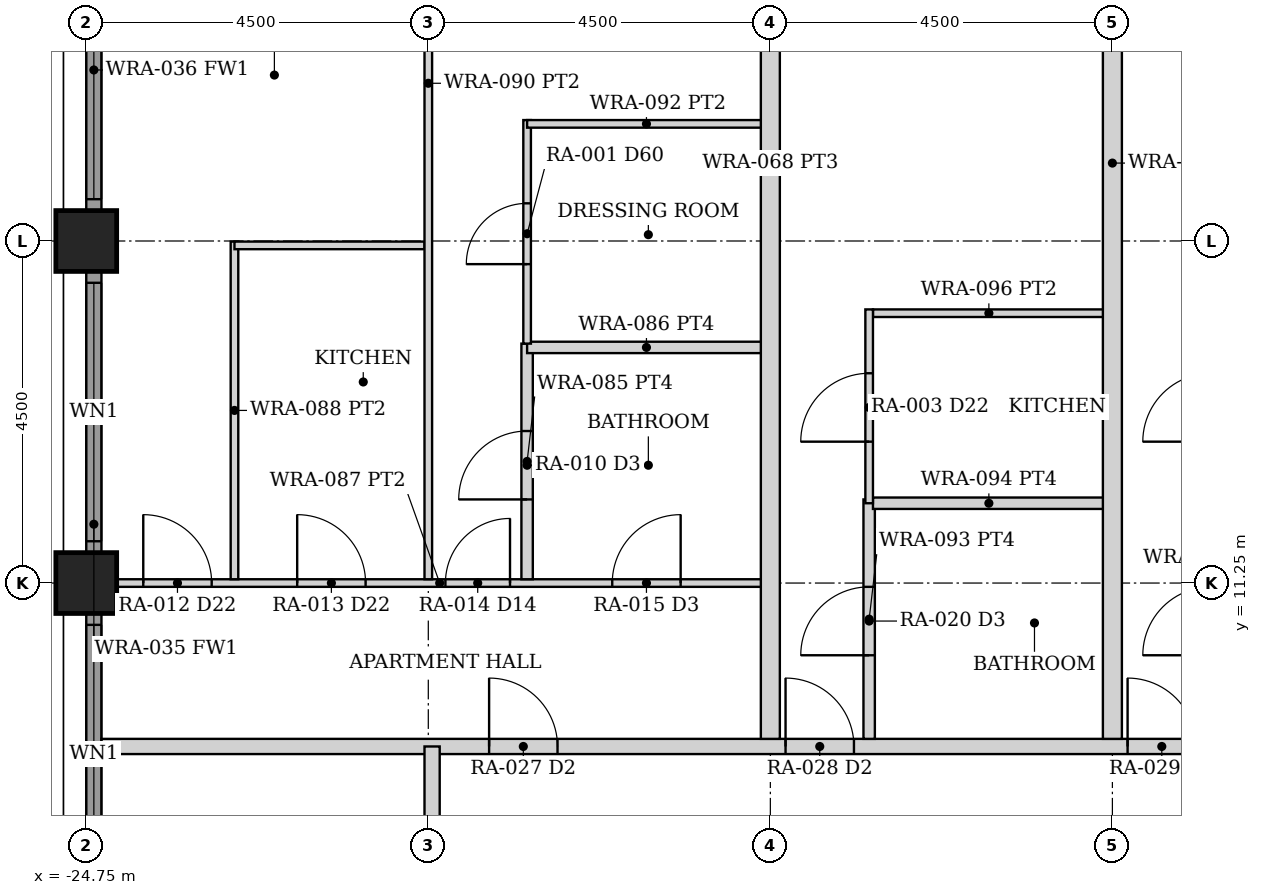
"""IFC4 building model, lengths in metres.
Left out: names, types, materials, properties, quantities, classifications, styles, units other than length and angle.
Written with IfcOpenShell. Run it as: python <this file> out.ifc"""

import sys

from ifc_helpers import new_model, si_unit, direction, frame, frame_2d, origin, origin_2d, place, context, subcontext, project, spatial, rectangle, hollow_rectangle, extrude, element, fill, save


model = new_model("IFC4")
c1 = context("Model", 3, precision=1e-05, world=origin(), true_north=direction((0.0, 1.0)))
c2 = subcontext(c1, "Body", "Model", "MODEL_VIEW")
j1 = project(units=[si_unit("LENGTHUNIT", "METRE"), si_unit("PLANEANGLEUNIT", "RADIAN")], contexts=[c1])
p1 = place(None, origin())
s1 = spatial("IfcSite", under=j1, at=p1, CompositionType="ELEMENT")
p2 = place(p1, origin())
s2 = spatial("IfcBuilding", under=s1, at=p2, CompositionType="ELEMENT")
p3 = place(p2, frame((0.0, 0.0, 30.0)))
s3 = spatial("IfcBuildingStorey", under=s2, at=p3, CompositionType="ELEMENT", Elevation=30.0)
for number, where, z_axis, x_axis in (
    (1, (-24.75, 11.25, 0.0), (0.0, 0.0, 1.0), (1.0, 0.0, 0.0)),
    (2, (-24.75, 15.75, 0.0), (0.0, 0.0, 1.0), (1.0, 0.0, 0.0)),
):
    element("IfcColumn", number, at=place(p3, frame(where, z_axis=z_axis, x_axis=x_axis)), inside=s3, PredefinedType="COLUMN", context=c2, shape_type="SweptSolid", body=[
        extrude(hollow_rectangle(XDim=0.8, YDim=0.8, WallThickness=0.08, at=origin_2d()), origin(), (0.0, 0.0, 1.0), 3.5),
    ])
p4 = place(p3, frame((-24.65, 7.155, 0.0), z_axis=(0.0, 0.0, 1.0), x_axis=(0.0, 1.0, 0.0)))
e3 = element("IfcWall", 3, at=p4, inside=s3, PredefinedType="SOLIDWALL", context=c2, shape_type="SweptSolid", body=[
    extrude(rectangle(XDim=3.69, YDim=0.2, at=frame_2d((1.845, 0.0))), origin(), (0.0, 0.0, 1.0), 2.379),
])
p5 = place(p4, frame((0.145, 0.0, 0.3)))
e4 = element("IfcOpeningElement", 4, at=p5, cuts=e3, PredefinedType="OPENING", context=c2, shape_type="SweptSolid", body=[
    extrude(rectangle(XDim=3.4, YDim=1.929, at=frame_2d((1.7, 0.964))), frame((0.0, 0.11, 0.0), z_axis=(0.0, -1.0, 0.0), x_axis=(1.0, 0.0, 0.0)), (0.0, 0.0, 1.0), 0.22),
])
p6 = place(p3, frame((-24.65, 11.655, 0.0), z_axis=(0.0, 0.0, 1.0), x_axis=(0.0, 1.0, 0.0)))
e5 = element("IfcWall", 5, at=p6, inside=s3, PredefinedType="SOLIDWALL", context=c2, shape_type="SweptSolid", body=[
    extrude(rectangle(XDim=3.69, YDim=0.2, at=frame_2d((1.845, 0.0))), origin(), (0.0, 0.0, 1.0), 2.379),
])
p7 = place(p6, frame((0.145, 0.0, 0.3)))
e6 = element("IfcOpeningElement", 6, at=p7, cuts=e5, PredefinedType="OPENING", context=c2, shape_type="SweptSolid", body=[
    extrude(rectangle(XDim=3.4, YDim=1.929, at=frame_2d((1.7, 0.964))), frame((0.0, 0.11, 0.0), z_axis=(0.0, -1.0, 0.0), x_axis=(1.0, 0.0, 0.0)), (0.0, 0.0, 1.0), 0.22),
])
p8 = place(p3, frame((-24.65, 16.155, 0.0), z_axis=(0.0, 0.0, 1.0), x_axis=(0.0, 1.0, 0.0)))
e7 = element("IfcWall", 7, at=p8, inside=s3, PredefinedType="SOLIDWALL", context=c2, shape_type="SweptSolid", body=[
    extrude(rectangle(XDim=3.69, YDim=0.2, at=frame_2d((1.845, 0.0))), origin(), (0.0, 0.0, 1.0), 2.379),
])
p9 = place(p8, frame((0.145, 0.0, 0.3)))
e8 = element("IfcOpeningElement", 8, at=p9, cuts=e7, PredefinedType="OPENING", context=c2, shape_type="SweptSolid", body=[
    extrude(rectangle(XDim=3.4, YDim=1.929, at=frame_2d((1.7, 0.964))), frame((0.0, 0.11, 0.0), z_axis=(0.0, -1.0, 0.0), x_axis=(1.0, 0.0, 0.0)), (0.0, 0.0, 1.0), 0.22),
])
p10 = place(p3, frame((-24.55, 9.1, 0.0), z_axis=(0.0, 0.0, 1.0), x_axis=(1.0, 0.0, 0.0)))
e9 = element("IfcWall", 9, at=p10, inside=s3, PredefinedType="PARTITIONING", context=c2, shape_type="SweptSolid", body=[
    extrude(rectangle(XDim=49.1, YDim=0.2, at=frame_2d((24.55, 0.0))), origin(), (0.0, 0.0, 1.0), 2.373),
])
p11 = place(p10, frame((5.1, 0.0, 0.0)))
e10 = element("IfcOpeningElement", 10, at=p11, cuts=e9, PredefinedType="OPENING", context=c2, shape_type="SweptSolid", body=[
    extrude(rectangle(XDim=0.9, YDim=2.1, at=frame_2d((0.45, 1.05))), frame((0.0, 0.11, 0.0), z_axis=(0.0, -1.0, 0.0), x_axis=(1.0, 0.0, 0.0)), (0.0, 0.0, 1.0), 0.22),
])
p12 = place(p10, frame((9.0, 0.0, 0.0)))
e11 = element("IfcOpeningElement", 11, at=p12, cuts=e9, PredefinedType="OPENING", context=c2, shape_type="SweptSolid", body=[
    extrude(rectangle(XDim=0.9, YDim=2.1, at=frame_2d((0.45, 1.05))), frame((0.0, 0.11, 0.0), z_axis=(0.0, -1.0, 0.0), x_axis=(1.0, 0.0, 0.0)), (0.0, 0.0, 1.0), 0.22),
])
p13 = place(p10, frame((13.5, 0.0, 0.0)))
e12 = element("IfcOpeningElement", 12, at=p13, cuts=e9, PredefinedType="OPENING", context=c2, shape_type="SweptSolid", body=[
    extrude(rectangle(XDim=0.9, YDim=2.1, at=frame_2d((0.45, 1.05))), frame((0.0, 0.11, 0.0), z_axis=(0.0, -1.0, 0.0), x_axis=(1.0, 0.0, 0.0)), (0.0, 0.0, 1.0), 0.22),
])
p14 = place(p10, frame((18.0, 0.0, 0.0)))
e13 = element("IfcOpeningElement", 13, at=p14, cuts=e9, PredefinedType="OPENING", context=c2, shape_type="SweptSolid", body=[
    extrude(rectangle(XDim=0.9, YDim=2.1, at=frame_2d((0.45, 1.05))), frame((0.0, 0.11, 0.0), z_axis=(0.0, -1.0, 0.0), x_axis=(1.0, 0.0, 0.0)), (0.0, 0.0, 1.0), 0.22),
])
p15 = place(p10, frame((22.5, 0.0, 0.0)))
e14 = element("IfcOpeningElement", 14, at=p15, cuts=e9, PredefinedType="OPENING", context=c2, shape_type="SweptSolid", body=[
    extrude(rectangle(XDim=0.9, YDim=2.1, at=frame_2d((0.45, 1.05))), frame((0.0, 0.11, 0.0), z_axis=(0.0, -1.0, 0.0), x_axis=(1.0, 0.0, 0.0)), (0.0, 0.0, 1.0), 0.22),
])
p16 = place(p10, frame((27.0, 0.0, 0.0)))
e15 = element("IfcOpeningElement", 15, at=p16, cuts=e9, PredefinedType="OPENING", context=c2, shape_type="SweptSolid", body=[
    extrude(rectangle(XDim=0.9, YDim=2.1, at=frame_2d((0.45, 1.05))), frame((0.0, 0.11, 0.0), z_axis=(0.0, -1.0, 0.0), x_axis=(1.0, 0.0, 0.0)), (0.0, 0.0, 1.0), 0.22),
])
p17 = place(p10, frame((31.5, 0.0, 0.0)))
e16 = element("IfcOpeningElement", 16, at=p17, cuts=e9, PredefinedType="OPENING", context=c2, shape_type="SweptSolid", body=[
    extrude(rectangle(XDim=0.9, YDim=2.1, at=frame_2d((0.45, 1.05))), frame((0.0, 0.11, 0.0), z_axis=(0.0, -1.0, 0.0), x_axis=(1.0, 0.0, 0.0)), (0.0, 0.0, 1.0), 0.22),
])
p18 = place(p10, frame((36.0, 0.0, 0.0)))
e17 = element("IfcOpeningElement", 17, at=p18, cuts=e9, PredefinedType="OPENING", context=c2, shape_type="SweptSolid", body=[
    extrude(rectangle(XDim=0.9, YDim=2.1, at=frame_2d((0.45, 1.05))), frame((0.0, 0.11, 0.0), z_axis=(0.0, -1.0, 0.0), x_axis=(1.0, 0.0, 0.0)), (0.0, 0.0, 1.0), 0.22),
])
p19 = place(p10, frame((43.1, 0.0, 0.0)))
e18 = element("IfcOpeningElement", 18, at=p19, cuts=e9, PredefinedType="OPENING", context=c2, shape_type="SweptSolid", body=[
    extrude(rectangle(XDim=0.9, YDim=2.1, at=frame_2d((0.45, 1.05))), frame((0.0, 0.11, 0.0), z_axis=(0.0, -1.0, 0.0), x_axis=(1.0, 0.0, 0.0)), (0.0, 0.0, 1.0), 0.22),
])
p20 = place(p3, frame((-20.2, -9.1, 0.0), z_axis=(0.0, 0.0, 1.0), x_axis=(0.0, 1.0, 0.0)))
e19 = element("IfcWall", 19, at=p20, inside=s3, PredefinedType="PARTITIONING", context=c2, shape_type="SweptSolid", body=[
    extrude(rectangle(XDim=18.2, YDim=0.2, at=frame_2d((9.1, 0.0))), origin(), (0.0, 0.0, 1.0), 2.373),
])
p21 = place(p20, frame((8.6, 0.0, 0.0)))
e20 = element("IfcOpeningElement", 20, at=p21, cuts=e19, PredefinedType="OPENING", context=c2, shape_type="SweptSolid", body=[
    extrude(rectangle(XDim=1.0, YDim=2.1, at=frame_2d((0.5, 1.05))), frame((0.0, 0.11, 0.0), z_axis=(0.0, -1.0, 0.0), x_axis=(1.0, 0.0, 0.0)), (0.0, 0.0, 1.0), 0.22),
])
p22 = place(p3, frame((-24.35, 11.25, 0.0), z_axis=(0.0, 0.0, 1.0), x_axis=(1.0, 0.0, 0.0)))
e21 = element("IfcWall", 21, at=p22, inside=s3, PredefinedType="PARTITIONING", context=c2, shape_type="SweptSolid", body=[
    extrude(rectangle(XDim=8.5, YDim=0.1, at=frame_2d((4.25, 0.0))), origin(), (0.0, 0.0, 1.0), 2.373),
])
p23 = place(p22, frame((2.375, 0.0, 0.0)))
e22 = element("IfcOpeningElement", 22, at=p23, cuts=e21, PredefinedType="OPENING", context=c2, shape_type="SweptSolid", body=[
    extrude(rectangle(XDim=0.9, YDim=2.1, at=frame_2d((0.45, 1.05))), frame((0.0, 0.06, 0.0), z_axis=(0.0, -1.0, 0.0), x_axis=(1.0, 0.0, 0.0)), (0.0, 0.0, 1.0), 0.12),
])
p24 = place(p22, frame((0.35, 0.0, 0.0)))
e23 = element("IfcOpeningElement", 23, at=p24, cuts=e21, PredefinedType="OPENING", context=c2, shape_type="SweptSolid", body=[
    extrude(rectangle(XDim=0.9, YDim=2.1, at=frame_2d((0.45, 1.05))), frame((0.0, 0.06, 0.0), z_axis=(0.0, -1.0, 0.0), x_axis=(1.0, 0.0, 0.0)), (0.0, 0.0, 1.0), 0.12),
])
p25 = place(p22, frame((4.325, 0.0, 0.0)))
e24 = element("IfcOpeningElement", 24, at=p25, cuts=e21, PredefinedType="OPENING", context=c2, shape_type="SweptSolid", body=[
    extrude(rectangle(XDim=0.85, YDim=2.1, at=frame_2d((0.425, 1.05))), frame((0.0, 0.06, 0.0), z_axis=(0.0, -1.0, 0.0), x_axis=(1.0, 0.0, 0.0)), (0.0, 0.0, 1.0), 0.12),
])
p26 = place(p22, frame((6.52, 0.0, 0.0)))
e25 = element("IfcOpeningElement", 25, at=p26, cuts=e21, PredefinedType="OPENING", context=c2, shape_type="SweptSolid", body=[
    extrude(rectangle(XDim=0.9, YDim=2.1, at=frame_2d((0.45, 1.05))), frame((0.0, 0.06, 0.0), z_axis=(0.0, -1.0, 0.0), x_axis=(1.0, 0.0, 0.0)), (0.0, 0.0, 1.0), 0.12),
])
p27 = place(p3, frame((-22.8, 11.3, 0.0), z_axis=(0.0, 0.0, 1.0), x_axis=(0.0, 1.0, 0.0)))
e26 = element("IfcWall", 26, at=p27, inside=s3, PredefinedType="PARTITIONING", context=c2, shape_type="SweptSolid", body=[
    extrude(rectangle(XDim=4.442, YDim=0.1, at=frame_2d((2.221, 0.0))), origin(), (0.0, 0.0, 1.0), 2.373),
])
p28 = place(p3, frame((-22.8, 15.692, 0.0), z_axis=(0.0, 0.0, 1.0), x_axis=(1.0, 0.0, 0.0)))
e27 = element("IfcWall", 27, at=p28, inside=s3, PredefinedType="PARTITIONING", context=c2, shape_type="SweptSolid", body=[
    extrude(rectangle(XDim=2.5, YDim=0.1, at=frame_2d((1.25, 0.0))), origin(), (0.0, 0.0, 1.0), 2.373),
])
p29 = place(p3, frame((-20.25, 11.3, 0.0), z_axis=(0.0, 0.0, 1.0), x_axis=(0.0, 1.0, 0.0)))
e28 = element("IfcWall", 28, at=p29, inside=s3, PredefinedType="PARTITIONING", context=c2, shape_type="SweptSolid", body=[
    extrude(rectangle(XDim=13.05, YDim=0.1, at=frame_2d((6.525, 0.0))), origin(), (0.0, 0.0, 1.0), 2.373),
])
p30 = place(p3, frame((-18.95, 11.3, 0.0), z_axis=(0.0, 0.0, 1.0), x_axis=(0.0, 1.0, 0.0)))
e29 = element("IfcWall", 29, at=p30, inside=s3, PredefinedType="PARTITIONING", context=c2, shape_type="SweptSolid", body=[
    extrude(rectangle(XDim=3.1, YDim=0.15, at=frame_2d((1.55, 0.0))), origin(), (0.0, 0.0, 1.0), 2.373),
])
p31 = place(p30, frame((1.05, 0.0, 0.0)))
e30 = element("IfcOpeningElement", 30, at=p31, cuts=e29, PredefinedType="OPENING", context=c2, shape_type="SweptSolid", body=[
    extrude(rectangle(XDim=0.9, YDim=2.1, at=frame_2d((0.45, 1.05))), frame((0.0, 0.085, 0.0), z_axis=(0.0, -1.0, 0.0), x_axis=(1.0, 0.0, 0.0)), (0.0, 0.0, 1.0), 0.17),
])
p32 = place(p3, frame((-18.95, 14.35, 0.0), z_axis=(0.0, 0.0, 1.0), x_axis=(1.0, 0.0, 0.0)))
e31 = element("IfcWall", 31, at=p32, inside=s3, PredefinedType="PARTITIONING", context=c2, shape_type="SweptSolid", body=[
    extrude(rectangle(XDim=3.14, YDim=0.15, at=frame_2d((1.57, 0.0))), origin(), (0.0, 0.0, 1.0), 2.373),
])
p33 = place(p3, frame((-18.95, 14.4, 0.0), z_axis=(0.0, 0.0, 1.0), x_axis=(0.0, 1.0, 0.0)))
e32 = element("IfcWall", 32, at=p33, inside=s3, PredefinedType="PARTITIONING", context=c2, shape_type="SweptSolid", body=[
    extrude(rectangle(XDim=2.941, YDim=0.1, at=frame_2d((1.47, 0.0))), origin(), (0.0, 0.0, 1.0), 2.373),
])
p34 = place(p33, frame((1.045, 0.0, 0.0)))
e33 = element("IfcOpeningElement", 33, at=p34, cuts=e32, PredefinedType="OPENING", context=c2, shape_type="SweptSolid", body=[
    extrude(rectangle(XDim=0.8, YDim=2.1, at=frame_2d((0.4, 1.05))), frame((0.0, 0.06, 0.0), z_axis=(0.0, -1.0, 0.0), x_axis=(1.0, 0.0, 0.0)), (0.0, 0.0, 1.0), 0.12),
])
p35 = place(p3, frame((-18.95, 17.291, 0.0), z_axis=(0.0, 0.0, 1.0), x_axis=(1.0, 0.0, 0.0)))
e34 = element("IfcWall", 34, at=p35, inside=s3, PredefinedType="PARTITIONING", context=c2, shape_type="SweptSolid", body=[
    extrude(rectangle(XDim=3.14, YDim=0.1, at=frame_2d((1.57, 0.0))), origin(), (0.0, 0.0, 1.0), 2.373),
])
p36 = place(p3, frame((-14.45, 9.2, 0.0), z_axis=(0.0, 0.0, 1.0), x_axis=(0.0, 1.0, 0.0)))
e35 = element("IfcWall", 35, at=p36, inside=s3, PredefinedType="PARTITIONING", context=c2, shape_type="SweptSolid", body=[
    extrude(rectangle(XDim=3.15, YDim=0.15, at=frame_2d((1.575, 0.0))), origin(), (0.0, 0.0, 1.0), 2.373),
])
p37 = place(p36, frame((1.1, 0.0, 0.0)))
e36 = element("IfcOpeningElement", 36, at=p37, cuts=e35, PredefinedType="OPENING", context=c2, shape_type="SweptSolid", body=[
    extrude(rectangle(XDim=0.9, YDim=2.1, at=frame_2d((0.45, 1.05))), frame((0.0, 0.085, 0.0), z_axis=(0.0, -1.0, 0.0), x_axis=(1.0, 0.0, 0.0)), (0.0, 0.0, 1.0), 0.17),
])
p38 = place(p3, frame((-14.4, 12.3, 0.0), z_axis=(0.0, 0.0, 1.0), x_axis=(1.0, 0.0, 0.0)))
e37 = element("IfcWall", 37, at=p38, inside=s3, PredefinedType="PARTITIONING", context=c2, shape_type="SweptSolid", body=[
    extrude(rectangle(XDim=3.05, YDim=0.15, at=frame_2d((1.525, 0.0))), origin(), (0.0, 0.0, 1.0), 2.373),
])
p39 = place(p3, frame((-14.4, 14.8, 0.0), z_axis=(0.0, 0.0, 1.0), x_axis=(1.0, 0.0, 0.0)))
e38 = element("IfcWall", 38, at=p39, inside=s3, PredefinedType="PARTITIONING", context=c2, shape_type="SweptSolid", body=[
    extrude(rectangle(XDim=3.05, YDim=0.1, at=frame_2d((1.525, 0.0))), origin(), (0.0, 0.0, 1.0), 2.373),
])
p40 = place(p3, frame((-14.45, 12.3, 0.0), z_axis=(0.0, 0.0, 1.0), x_axis=(0.0, 1.0, 0.0)))
e39 = element("IfcWall", 39, at=p40, inside=s3, PredefinedType="PARTITIONING", context=c2, shape_type="SweptSolid", body=[
    extrude(rectangle(XDim=2.55, YDim=0.1, at=frame_2d((1.275, 0.0))), origin(), (0.0, 0.0, 1.0), 2.373),
])
p41 = place(p40, frame((0.81, 0.0, 0.0)))
e40 = element("IfcOpeningElement", 40, at=p41, cuts=e39, PredefinedType="OPENING", context=c2, shape_type="SweptSolid", body=[
    extrude(rectangle(XDim=0.9, YDim=2.1, at=frame_2d((0.45, 1.05))), frame((0.0, 0.06, 0.0), z_axis=(0.0, -1.0, 0.0), x_axis=(1.0, 0.0, 0.0)), (0.0, 0.0, 1.0), 0.12),
])
for number, where, z_axis, x_axis in (
    (41, (-15.75, 9.2, 0.0), (0.0, 0.0, 1.0), (0.0, 1.0, 0.0)),
    (42, (-11.25, 9.2, 0.0), (0.0, 0.0, 1.0), (0.0, 1.0, 0.0)),
):
    element("IfcWall", number, at=place(p3, frame(where, z_axis=z_axis, x_axis=x_axis)), inside=s3, PredefinedType="PARTITIONING", context=c2, shape_type="SweptSolid", body=[
        extrude(rectangle(XDim=15.15, YDim=0.25, at=frame_2d((7.575, 0.0))), origin(), (0.0, 0.0, 1.0), 2.373),
    ])
p42 = place(p5, origin())
e43 = element("IfcWindow", 43, at=p42, inside=s3, PartitioningType="SINGLE_PANEL", PredefinedType="WINDOW", context=c2, shape_type="SweptSolid", body=[
    extrude(rectangle(XDim=3.4, YDim=1.929, at=frame_2d((1.7, 0.964))), frame((0.0, 0.03, 0.0), z_axis=(0.0, -1.0, 0.0), x_axis=(1.0, 0.0, 0.0)), (0.0, 0.0, 1.0), 0.06),
])
fill(e4, e43)
p43 = place(p7, origin())
e44 = element("IfcWindow", 44, at=p43, inside=s3, PartitioningType="SINGLE_PANEL", PredefinedType="WINDOW", context=c2, shape_type="SweptSolid", body=[
    extrude(rectangle(XDim=3.4, YDim=1.929, at=frame_2d((1.7, 0.964))), frame((0.0, 0.03, 0.0), z_axis=(0.0, -1.0, 0.0), x_axis=(1.0, 0.0, 0.0)), (0.0, 0.0, 1.0), 0.06),
])
fill(e6, e44)
p44 = place(p9, origin())
e45 = element("IfcWindow", 45, at=p44, inside=s3, PartitioningType="SINGLE_PANEL", PredefinedType="WINDOW", context=c2, shape_type="SweptSolid", body=[
    extrude(rectangle(XDim=3.4, YDim=1.929, at=frame_2d((1.7, 0.964))), frame((0.0, 0.03, 0.0), z_axis=(0.0, -1.0, 0.0), x_axis=(1.0, 0.0, 0.0)), (0.0, 0.0, 1.0), 0.06),
])
fill(e8, e45)
p45 = place(p11, origin())
e46 = element("IfcDoor", 46, at=p45, inside=s3, OperationType="SINGLE_SWING_LEFT", PredefinedType="DOOR", context=c2, shape_type="SweptSolid", body=[
    extrude(rectangle(XDim=0.9, YDim=2.1, at=frame_2d((0.45, 1.05))), frame((0.0, 0.025, 0.0), z_axis=(0.0, -1.0, 0.0), x_axis=(1.0, 0.0, 0.0)), (0.0, 0.0, 1.0), 0.05),
])
fill(e10, e46)
p46 = place(p23, origin())
e47 = element("IfcDoor", 47, at=p46, inside=s3, OperationType="SINGLE_SWING_LEFT", PredefinedType="DOOR", context=c2, shape_type="SweptSolid", body=[
    extrude(rectangle(XDim=0.9, YDim=2.1, at=frame_2d((0.45, 1.05))), frame((0.0, 0.025, 0.0), z_axis=(0.0, -1.0, 0.0), x_axis=(1.0, 0.0, 0.0)), (0.0, 0.0, 1.0), 0.05),
])
fill(e22, e47)
p47 = place(p24, origin())
e48 = element("IfcDoor", 48, at=p47, inside=s3, OperationType="SINGLE_SWING_LEFT", PredefinedType="DOOR", context=c2, shape_type="SweptSolid", body=[
    extrude(rectangle(XDim=0.9, YDim=2.1, at=frame_2d((0.45, 1.05))), frame((0.0, 0.025, 0.0), z_axis=(0.0, -1.0, 0.0), x_axis=(1.0, 0.0, 0.0)), (0.0, 0.0, 1.0), 0.05),
])
fill(e23, e48)
p48 = place(p25, origin())
e49 = element("IfcDoor", 49, at=p48, inside=s3, OperationType="SINGLE_SWING_RIGHT", PredefinedType="DOOR", context=c2, shape_type="SweptSolid", body=[
    extrude(rectangle(XDim=0.85, YDim=2.1, at=frame_2d((0.425, 1.05))), frame((0.0, 0.025, 0.0), z_axis=(0.0, -1.0, 0.0), x_axis=(1.0, 0.0, 0.0)), (0.0, 0.0, 1.0), 0.05),
])
fill(e24, e49)
p49 = place(p31, origin())
e50 = element("IfcDoor", 50, at=p49, inside=s3, OperationType="SINGLE_SWING_LEFT", PredefinedType="DOOR", context=c2, shape_type="SweptSolid", body=[
    extrude(rectangle(XDim=0.9, YDim=2.1, at=frame_2d((0.45, 1.05))), frame((0.0, 0.025, 0.0), z_axis=(0.0, -1.0, 0.0), x_axis=(1.0, 0.0, 0.0)), (0.0, 0.0, 1.0), 0.05),
])
fill(e30, e50)
p50 = place(p26, origin())
e51 = element("IfcDoor", 51, at=p50, inside=s3, OperationType="SINGLE_SWING_RIGHT", PredefinedType="DOOR", context=c2, shape_type="SweptSolid", body=[
    extrude(rectangle(XDim=0.9, YDim=2.1, at=frame_2d((0.45, 1.05))), frame((0.0, 0.025, 0.0), z_axis=(0.0, -1.0, 0.0), x_axis=(1.0, 0.0, 0.0)), (0.0, 0.0, 1.0), 0.05),
])
fill(e25, e51)
p51 = place(p34, origin())
e52 = element("IfcDoor", 52, at=p51, inside=s3, OperationType="SINGLE_SWING_LEFT", PredefinedType="DOOR", context=c2, shape_type="SweptSolid", body=[
    extrude(rectangle(XDim=0.8, YDim=2.1, at=frame_2d((0.4, 1.05))), frame((0.0, 0.025, 0.0), z_axis=(0.0, -1.0, 0.0), x_axis=(1.0, 0.0, 0.0)), (0.0, 0.0, 1.0), 0.05),
])
fill(e33, e52)
p52 = place(p12, origin())
e53 = element("IfcDoor", 53, at=p52, inside=s3, OperationType="SINGLE_SWING_LEFT", PredefinedType="DOOR", context=c2, shape_type="SweptSolid", body=[
    extrude(rectangle(XDim=0.9, YDim=2.1, at=frame_2d((0.45, 1.05))), frame((0.0, 0.025, 0.0), z_axis=(0.0, -1.0, 0.0), x_axis=(1.0, 0.0, 0.0)), (0.0, 0.0, 1.0), 0.05),
])
fill(e11, e53)
p53 = place(p37, origin())
e54 = element("IfcDoor", 54, at=p53, inside=s3, OperationType="SINGLE_SWING_LEFT", PredefinedType="DOOR", context=c2, shape_type="SweptSolid", body=[
    extrude(rectangle(XDim=0.9, YDim=2.1, at=frame_2d((0.45, 1.05))), frame((0.0, 0.025, 0.0), z_axis=(0.0, -1.0, 0.0), x_axis=(1.0, 0.0, 0.0)), (0.0, 0.0, 1.0), 0.05),
])
fill(e36, e54)
p54 = place(p41, origin())
e55 = element("IfcDoor", 55, at=p54, inside=s3, OperationType="SINGLE_SWING_LEFT", PredefinedType="DOOR", context=c2, shape_type="SweptSolid", body=[
    extrude(rectangle(XDim=0.9, YDim=2.1, at=frame_2d((0.45, 1.05))), frame((0.0, 0.025, 0.0), z_axis=(0.0, -1.0, 0.0), x_axis=(1.0, 0.0, 0.0)), (0.0, 0.0, 1.0), 0.05),
])
fill(e40, e55)
p55 = place(p13, origin())
e56 = element("IfcDoor", 56, at=p55, inside=s3, OperationType="SINGLE_SWING_LEFT", PredefinedType="DOOR", context=c2, shape_type="SweptSolid", body=[
    extrude(rectangle(XDim=0.9, YDim=2.1, at=frame_2d((0.45, 1.05))), frame((0.0, 0.025, 0.0), z_axis=(0.0, -1.0, 0.0), x_axis=(1.0, 0.0, 0.0)), (0.0, 0.0, 1.0), 0.05),
])
fill(e12, e56)
save(model, sys.argv[1])
